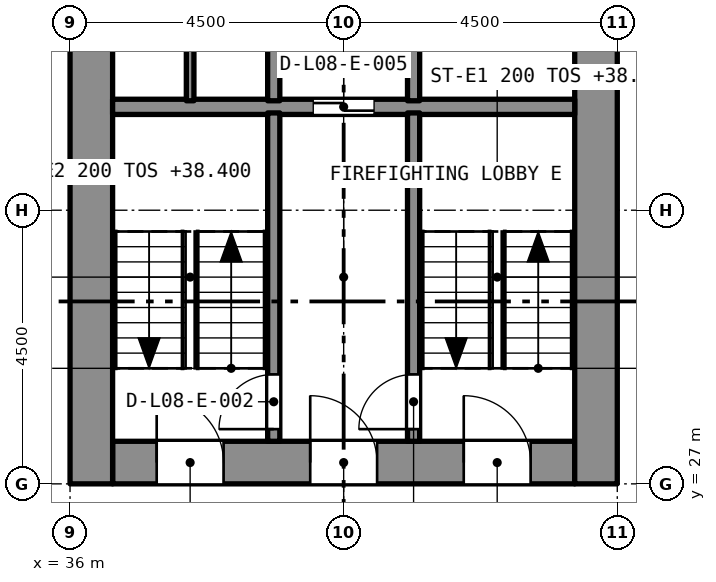
"""IFC4 building model, lengths in metres.
Left out: names, types, materials, properties, quantities, classifications, styles, units other than length and angle.
Written with IfcOpenShell. Run it as: python <this file> out.ifc"""

import sys

from ifc_helpers import new_model, si_unit, direction, frame, frame_2d, origin, place, context, subcontext, project, spatial, rectangle, extrude, element, fill, save


model = new_model("IFC4")
c1 = context("Model", 3, precision=1e-05, world=origin(), true_north=direction((0.0, 1.0)))
c2 = subcontext(c1, "Body", "Model", "MODEL_VIEW")
j1 = project(units=[si_unit("LENGTHUNIT", "METRE"), si_unit("PLANEANGLEUNIT", "RADIAN")], contexts=[c1])
p1 = place(None, origin())
s1 = spatial("IfcSite", under=j1, at=p1, CompositionType="ELEMENT")
p2 = place(p1, origin())
s2 = spatial("IfcBuilding", under=s1, at=p2, CompositionType="ELEMENT")
p3 = place(p2, frame((0.0, 0.0, 36.8)))
s3 = spatial("IfcBuildingStorey", under=s2, at=p3, CompositionType="ELEMENT", Elevation=36.8)
p4 = place(p3, frame((36.7, 27.35, 0.0), z_axis=(0.0, 0.0, 1.0), x_axis=(1.0, 0.0, 0.0)))
e1 = element("IfcWall", 1, at=p4, inside=s3, PredefinedType="SOLIDWALL", context=c2, shape_type="SweptSolid", body=[
    extrude(rectangle(XDim=7.6, YDim=0.7, at=frame_2d((3.8, 0.0))), origin(), (0.0, 0.0, 1.0), 3.2),
])
p5 = place(p4, frame((5.775, 0.0, 0.0)))
e2 = element("IfcOpeningElement", 2, at=p5, cuts=e1, PredefinedType="OPENING", context=c2, shape_type="SweptSolid", body=[
    extrude(rectangle(XDim=1.1, YDim=2.1, at=frame_2d((0.55, 1.05))), frame((0.0, 0.36, 0.0), z_axis=(0.0, -1.0, 0.0), x_axis=(1.0, 0.0, 0.0)), (0.0, 0.0, 1.0), 0.72),
])
p6 = place(p4, frame((3.25, 0.0, 0.0)))
e3 = element("IfcOpeningElement", 3, at=p6, cuts=e1, PredefinedType="OPENING", context=c2, shape_type="SweptSolid", body=[
    extrude(rectangle(XDim=1.1, YDim=2.1, at=frame_2d((0.55, 1.05))), frame((0.0, 0.36, 0.0), z_axis=(0.0, -1.0, 0.0), x_axis=(1.0, 0.0, 0.0)), (0.0, 0.0, 1.0), 0.72),
])
p7 = place(p4, frame((0.725, 0.0, 0.0)))
e4 = element("IfcOpeningElement", 4, at=p7, cuts=e1, PredefinedType="OPENING", context=c2, shape_type="SweptSolid", body=[
    extrude(rectangle(XDim=1.1, YDim=2.1, at=frame_2d((0.55, 1.05))), frame((0.0, 0.36, 0.0), z_axis=(0.0, -1.0, 0.0), x_axis=(1.0, 0.0, 0.0)), (0.0, 0.0, 1.0), 0.72),
])
p8 = place(p3, frame((36.35, 27.0, 0.0), z_axis=(0.0, 0.0, 1.0), x_axis=(0.0, 1.0, 0.0)))
e5 = element("IfcWall", 5, at=p8, inside=s3, PredefinedType="SOLIDWALL", context=c2, shape_type="SweptSolid", body=[
    extrude(rectangle(XDim=13.5, YDim=0.7, at=frame_2d((6.75, 0.0))), origin(), (0.0, 0.0, 1.0), 3.2),
])
p9 = place(p8, frame((8.95, 0.0, 0.0)))
e6 = element("IfcOpeningElement", 6, at=p9, cuts=e5, PredefinedType="OPENING", context=c2, shape_type="SweptSolid", body=[
    extrude(rectangle(XDim=1.2, YDim=2.1, at=frame_2d((0.6, 1.05))), frame((0.0, 0.36, 0.0), z_axis=(0.0, -1.0, 0.0), x_axis=(1.0, 0.0, 0.0)), (0.0, 0.0, 1.0), 0.72),
])
p10 = place(p3, frame((44.65, 27.0, 0.0), z_axis=(0.0, 0.0, 1.0), x_axis=(0.0, 1.0, 0.0)))
e7 = element("IfcWall", 7, at=p10, inside=s3, PredefinedType="SOLIDWALL", context=c2, shape_type="SweptSolid", body=[
    extrude(rectangle(XDim=13.5, YDim=0.7, at=frame_2d((6.75, 0.0))), origin(), (0.0, 0.0, 1.0), 3.2),
])
p11 = place(p10, frame((8.95, 0.0, 0.0)))
e8 = element("IfcOpeningElement", 8, at=p11, cuts=e7, PredefinedType="OPENING", context=c2, shape_type="SweptSolid", body=[
    extrude(rectangle(XDim=1.2, YDim=2.1, at=frame_2d((0.6, 1.05))), frame((0.0, 0.36, 0.0), z_axis=(0.0, -1.0, 0.0), x_axis=(1.0, 0.0, 0.0)), (0.0, 0.0, 1.0), 0.72),
])
p12 = place(p3, frame((36.7, 33.2, 0.0), z_axis=(0.0, 0.0, 1.0), x_axis=(1.0, 0.0, 0.0)))
e9 = element("IfcWall", 9, at=p12, inside=s3, PredefinedType="SOLIDWALL", context=c2, shape_type="SweptSolid", body=[
    extrude(rectangle(XDim=7.6, YDim=0.25, at=frame_2d((3.8, 0.0))), origin(), (0.0, 0.0, 1.0), 2.9),
])
p13 = place(p12, frame((3.3, 0.0, 0.0)))
e10 = element("IfcOpeningElement", 10, at=p13, cuts=e9, PredefinedType="OPENING", context=c2, shape_type="SweptSolid", body=[
    extrude(rectangle(XDim=1.0, YDim=2.1, at=frame_2d((0.5, 1.05))), frame((0.0, 0.135, 0.0), z_axis=(0.0, -1.0, 0.0), x_axis=(1.0, 0.0, 0.0)), (0.0, 0.0, 1.0), 0.27),
])
p14 = place(p3, frame((41.65, 27.7, 0.0), z_axis=(0.0, 0.0, 1.0), x_axis=(0.0, 1.0, 0.0)))
e11 = element("IfcWall", 11, at=p14, inside=s3, PredefinedType="SOLIDWALL", context=c2, shape_type="SweptSolid", body=[
    extrude(rectangle(XDim=5.4, YDim=0.2, at=frame_2d((2.7, 0.0))), origin(), (0.0, 0.0, 1.0), 2.9),
])
p15 = place(p14, frame((0.2, 0.0, 0.0)))
e12 = element("IfcOpeningElement", 12, at=p15, cuts=e11, PredefinedType="OPENING", context=c2, shape_type="SweptSolid", body=[
    extrude(rectangle(XDim=0.9, YDim=2.1, at=frame_2d((0.45, 1.05))), frame((0.0, 0.11, 0.0), z_axis=(0.0, -1.0, 0.0), x_axis=(1.0, 0.0, 0.0)), (0.0, 0.0, 1.0), 0.22),
])
p16 = place(p3, frame((39.35, 27.7, 0.0), z_axis=(0.0, 0.0, 1.0), x_axis=(0.0, 1.0, 0.0)))
e13 = element("IfcWall", 13, at=p16, inside=s3, PredefinedType="SOLIDWALL", context=c2, shape_type="SweptSolid", body=[
    extrude(rectangle(XDim=5.4, YDim=0.2, at=frame_2d((2.7, 0.0))), origin(), (0.0, 0.0, 1.0), 2.9),
])
p17 = place(p16, frame((0.2, 0.0, 0.0)))
e14 = element("IfcOpeningElement", 14, at=p17, cuts=e13, PredefinedType="OPENING", context=c2, shape_type="SweptSolid", body=[
    extrude(rectangle(XDim=0.9, YDim=2.1, at=frame_2d((0.45, 1.05))), frame((0.0, 0.11, 0.0), z_axis=(0.0, -1.0, 0.0), x_axis=(1.0, 0.0, 0.0)), (0.0, 0.0, 1.0), 0.22),
])
for number, where, z_axis, x_axis in (
    (15, (41.65, 33.3, 0.0), (0.0, 0.0, 1.0), (0.0, 1.0, 0.0)),
    (16, (39.35, 33.3, 0.0), (0.0, 0.0, 1.0), (0.0, 1.0, 0.0)),
):
    element("IfcWall", number, at=place(p3, frame(where, z_axis=z_axis, x_axis=x_axis)), inside=s3, PredefinedType="SOLIDWALL", context=c2, shape_type="SweptSolid", body=[
        extrude(rectangle(XDim=2.3, YDim=0.2, at=frame_2d((1.15, 0.0))), origin(), (0.0, 0.0, 1.0), 2.9),
    ])
p18 = place(p3, frame((37.975, 33.3, 0.0), z_axis=(0.0, 0.0, 1.0), x_axis=(0.0, 1.0, 0.0)))
e17 = element("IfcWall", 17, at=p18, inside=s3, PredefinedType="PARTITIONING", context=c2, shape_type="SweptSolid", body=[
    extrude(rectangle(XDim=2.3, YDim=0.125, at=frame_2d((1.15, 0.0))), origin(), (0.0, 0.0, 1.0), 2.9),
])
p19 = place(p15, origin())
e18 = element("IfcDoor", 18, at=p19, inside=s3, OperationType="SINGLE_SWING_LEFT", PredefinedType="DOOR", context=c2, shape_type="SweptSolid", body=[
    extrude(rectangle(XDim=0.9, YDim=2.1, at=frame_2d((0.45, 1.05))), frame((0.0, 0.025, 0.0), z_axis=(0.0, -1.0, 0.0), x_axis=(1.0, 0.0, 0.0)), (0.0, 0.0, 1.0), 0.05),
])
fill(e12, e18)
p20 = place(p17, origin())
e19 = element("IfcDoor", 19, at=p20, inside=s3, OperationType="SINGLE_SWING_LEFT", PredefinedType="DOOR", context=c2, shape_type="SweptSolid", body=[
    extrude(rectangle(XDim=0.9, YDim=2.1, at=frame_2d((0.45, 1.05))), frame((0.0, 0.025, 0.0), z_axis=(0.0, -1.0, 0.0), x_axis=(1.0, 0.0, 0.0)), (0.0, 0.0, 1.0), 0.05),
])
fill(e14, e19)
p21 = place(p13, origin())
e20 = element("IfcDoor", 20, at=p21, inside=s3, OperationType="SLIDING_TO_LEFT", PredefinedType="DOOR", context=c2, shape_type="SweptSolid", body=[
    extrude(rectangle(XDim=1.0, YDim=2.1, at=frame_2d((0.5, 1.05))), frame((0.0, 0.025, 0.0), z_axis=(0.0, -1.0, 0.0), x_axis=(1.0, 0.0, 0.0)), (0.0, 0.0, 1.0), 0.05),
])
fill(e10, e20)
p22 = place(p5, origin())
e21 = element("IfcDoor", 21, at=p22, inside=s3, OperationType="SINGLE_SWING_LEFT", PredefinedType="DOOR", context=c2, shape_type="SweptSolid", body=[
    extrude(rectangle(XDim=1.1, YDim=2.1, at=frame_2d((0.55, 1.05))), frame((0.0, 0.025, 0.0), z_axis=(0.0, -1.0, 0.0), x_axis=(1.0, 0.0, 0.0)), (0.0, 0.0, 1.0), 0.05),
])
fill(e2, e21)
p23 = place(p6, origin())
e22 = element("IfcDoor", 22, at=p23, inside=s3, OperationType="SINGLE_SWING_LEFT", PredefinedType="DOOR", context=c2, shape_type="SweptSolid", body=[
    extrude(rectangle(XDim=1.1, YDim=2.1, at=frame_2d((0.55, 1.05))), frame((0.0, 0.025, 0.0), z_axis=(0.0, -1.0, 0.0), x_axis=(1.0, 0.0, 0.0)), (0.0, 0.0, 1.0), 0.05),
])
fill(e3, e22)
p24 = place(p7, origin())
e23 = element("IfcDoor", 23, at=p24, inside=s3, OperationType="SINGLE_SWING_LEFT", PredefinedType="DOOR", context=c2, shape_type="SweptSolid", body=[
    extrude(rectangle(XDim=1.1, YDim=2.1, at=frame_2d((0.55, 1.05))), frame((0.0, 0.025, 0.0), z_axis=(0.0, -1.0, 0.0), x_axis=(1.0, 0.0, 0.0)), (0.0, 0.0, 1.0), 0.05),
])
fill(e4, e23)
save(model, sys.argv[1])
